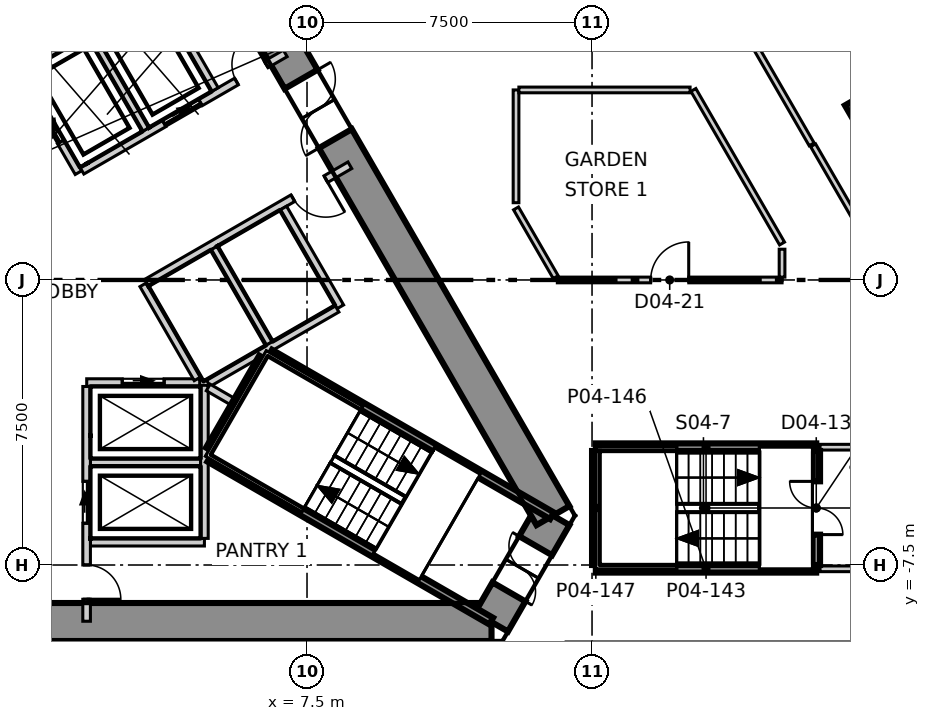
"""IFC4 building model, lengths in metres.
Left out: names, types, materials, properties, quantities, classifications, styles, units other than length and angle.
Written with IfcOpenShell. Run it as: python <this file> out.ifc"""

import sys

from ifc_helpers import new_model, si_unit, direction, frame, frame_2d, origin, origin_2d, place, context, subcontext, project, spatial, polyline, rectangle, outline, extrude, element, fill, save


model = new_model("IFC4")
c1 = context("Model", 3, precision=1e-05, world=origin(), true_north=direction((0.0, 1.0)))
c2 = subcontext(c1, "Body", "Model", "MODEL_VIEW")
j1 = project(units=[si_unit("LENGTHUNIT", "METRE"), si_unit("PLANEANGLEUNIT", "RADIAN")], contexts=[c1])
p1 = place(None, origin())
s1 = spatial("IfcSite", under=j1, at=p1, CompositionType="ELEMENT")
p2 = place(p1, origin())
s2 = spatial("IfcBuilding", under=s1, at=p2, CompositionType="ELEMENT")
p3 = place(p2, frame((0.0, 0.0, 25.3)))
s3 = spatial("IfcBuildingStorey", under=s2, at=p3, CompositionType="ELEMENT", Elevation=25.3)
p4 = place(p3, frame((-12.355, -9.0, -0.4), z_axis=(0.0, 0.0, 1.0), x_axis=(1.0, 0.0, 0.0)))
e1 = element("IfcWall", 1, at=p4, inside=s3, PredefinedType="SHEAR", context=c2, shape_type="SweptSolid", body=[
    extrude(outline(polyline([(-0.289, -0.5), (1.656, -0.5), (3.601, -0.5), (5.547, -0.5), (7.492, -0.5), (9.437, -0.5), (11.382, -0.5), (13.328, -0.5), (15.273, -0.5), (17.218, -0.5), (19.163, -0.5), (21.109, -0.5), (23.054, -0.5), (24.999, -0.5), (24.422, 0.5), (22.566, 0.5), (20.709, 0.5), (18.853, 0.5), (16.996, 0.5), (15.14, 0.5), (13.283, 0.5), (11.427, 0.5), (9.57, 0.5), (7.714, 0.5), (5.857, 0.5), (4.001, 0.5), (2.145, 0.5), (0.288, 0.5), (-0.289, -0.5)])), origin(), (0.0, 0.0, 1.0), 5.0),
])
p5 = place(p3, frame((12.355, -9.0, -0.4), z_axis=(0.0, 0.0, 1.0), x_axis=(0.500077567175, 0.865980615723, 0.0)))
e2 = element("IfcWall", 2, at=p5, inside=s3, PredefinedType="SHEAR", context=c2, shape_type="SweptSolid", body=[
    extrude(outline(polyline([(-0.288, -0.5), (1.617, -0.5), (3.522, -0.5), (2.945, 0.5), (1.617, 0.5), (0.289, 0.499), (-0.288, -0.5)])), origin(), (0.0, 0.0, 1.0), 5.0),
])
p6 = place(p5, frame((0.917, 0.0, 0.4)))
e3 = element("IfcOpeningElement", 3, at=p6, cuts=e2, PredefinedType="OPENING", context=c2, shape_type="SweptSolid", body=[
    extrude(rectangle(XDim=1.4, YDim=2.1, at=frame_2d((0.7, 1.05))), frame((0.0, 0.51, 0.0), z_axis=(0.0, -1.0, 0.0), x_axis=(1.0, 0.0, 0.0)), (0.0, 0.0, 1.0), 1.02),
])
p7 = place(p3, frame((13.972, -6.2, -0.4), z_axis=(0.0, 0.0, 1.0), x_axis=(-0.499992141631, 0.866029940768, 0.0)))
e4 = element("IfcWall", 4, at=p7, inside=s3, PredefinedType="SHEAR", context=c2, shape_type="SweptSolid", body=[
    extrude(outline(polyline([(-0.288, -0.5), (1.657, -0.5), (3.602, -0.5), (5.547, -0.5), (7.493, -0.5), (9.438, -0.5), (11.383, -0.5), (13.328, -0.5), (15.273, -0.5), (17.218, -0.499), (19.164, -0.499), (21.109, -0.499), (23.054, -0.499), (24.999, -0.499), (24.422, 0.5), (22.566, 0.5), (20.709, 0.5), (18.853, 0.5), (16.996, 0.5), (15.14, 0.5), (13.283, 0.5), (11.427, 0.5), (9.57, 0.5), (7.714, 0.5), (5.857, 0.5), (4.001, 0.5), (2.145, 0.5), (0.288, 0.5), (-0.288, -0.5)])), origin(), (0.0, 0.0, 1.0), 5.0),
])
p8 = place(p7, frame((11.455, 0.0, 0.4)))
e5 = element("IfcOpeningElement", 5, at=p8, cuts=e4, PredefinedType="OPENING", context=c2, shape_type="SweptSolid", body=[
    extrude(rectangle(XDim=1.8, YDim=2.1, at=frame_2d((0.9, 1.05))), frame((0.0, 0.51, 0.0), z_axis=(0.0, -1.0, 0.0), x_axis=(1.0, 0.0, 0.0)), (0.0, 0.0, 1.0), 1.02),
])
p9 = place(p3, frame((22.506, 4.219, -0.4), z_axis=(0.0, 0.0, 1.0), x_axis=(-0.5, 0.866025403784, 0.0)))
e6 = element("IfcColumn", 6, at=p9, inside=s3, PredefinedType="COLUMN", context=c2, shape_type="SweptSolid", body=[
    extrude(rectangle(XDim=1.5, YDim=1.1, at=origin_2d()), origin(), (0.0, 0.0, 1.0), 5.0),
])
for number, where, z_axis, x_axis in (
    (7, (21.0, -7.6, 0.0), (0.0, 0.0, 1.0), (1.0, 0.0, 0.0)),
    (8, (21.0, -4.4, 0.0), (0.0, 0.0, 1.0), (1.0, 0.0, 0.0)),
):
    element("IfcWall", number, at=place(p3, frame(where, z_axis=z_axis, x_axis=x_axis)), inside=s3, PredefinedType="PARTITIONING", context=c2, shape_type="SweptSolid", body=[
        extrude(rectangle(XDim=1.9, YDim=0.15, at=frame_2d((0.95, 0.0))), origin(), (0.0, 0.0, 1.0), 4.6),
    ])
p10 = place(p3, frame((20.817, 3.544, 0.0), z_axis=(0.0, 0.0, 1.0), x_axis=(0.500067837396, -0.865986234303, 0.0)))
e9 = element("IfcWall", 9, at=p10, inside=s3, PredefinedType="PARTITIONING", context=c2, shape_type="SweptSolid", body=[
    extrude(rectangle(XDim=2.366, YDim=0.15, at=frame_2d((1.183, 0.0))), origin(), (0.0, 0.0, 1.0), 4.6),
])
p11 = place(p3, frame((18.81, 6.98, 0.0), z_axis=(0.0, 0.0, 1.0), x_axis=(0.499946039687, -0.866056555544, 0.0)))
e10 = element("IfcWall", 10, at=p11, inside=s3, PredefinedType="PARTITIONING", context=c2, shape_type="SweptSolid", body=[
    extrude(rectangle(XDim=3.938, YDim=0.15, at=frame_2d((1.969, 0.0))), origin(), (0.0, 0.0, 1.0), 4.6),
])
p12 = place(p3, frame((14.087, 0.0, 0.0), z_axis=(0.0, 0.0, 1.0), x_axis=(1.0, 0.0, 0.0)))
e11 = element("IfcWall", 11, at=p12, inside=s3, PredefinedType="PARTITIONING", context=c2, shape_type="SweptSolid", body=[
    extrude(rectangle(XDim=5.913, YDim=0.15, at=frame_2d((2.957, 0.0))), origin(), (0.0, 0.0, 1.0), 4.6),
])
p13 = place(p12, frame((2.457, 0.0, 0.0)))
e12 = element("IfcOpeningElement", 12, at=p13, cuts=e11, PredefinedType="OPENING", context=c2, shape_type="SweptSolid", body=[
    extrude(rectangle(XDim=1.0, YDim=2.1, at=frame_2d((0.5, 1.05))), frame((0.0, 0.085, 0.0), z_axis=(0.0, -1.0, 0.0), x_axis=(1.0, 0.0, 0.0)), (0.0, 0.0, 1.0), 0.17),
])
p14 = place(p3, frame((17.667, 5.0, 0.0), z_axis=(0.0, 0.0, 1.0), x_axis=(0.499988162555, -0.866032238029, 0.0)))
e13 = element("IfcWall", 13, at=p14, inside=s3, PredefinedType="PARTITIONING", context=c2, shape_type="SweptSolid", body=[
    extrude(rectangle(XDim=4.666, YDim=0.15, at=frame_2d((2.333, 0.0))), origin(), (0.0, 0.0, 1.0), 4.6),
])
p15 = place(p3, frame((13.0, 1.883, 0.0), z_axis=(0.0, 0.0, 1.0), x_axis=(0.50001262068, -0.866018117109, 0.0)))
e14 = element("IfcWall", 14, at=p15, inside=s3, PredefinedType="PARTITIONING", context=c2, shape_type="SweptSolid", body=[
    extrude(rectangle(XDim=2.088, YDim=0.15, at=frame_2d((1.044, 0.0))), origin(), (0.0, 0.0, 1.0), 4.6),
])
p16 = place(p3, frame((13.0, 2.033, 0.0), z_axis=(0.0, 0.0, 1.0), x_axis=(0.0, 1.0, 0.0)))
e15 = element("IfcWall", 15, at=p16, inside=s3, PredefinedType="PARTITIONING", context=c2, shape_type="SweptSolid", body=[
    extrude(rectangle(XDim=2.967, YDim=0.15, at=frame_2d((1.483, 0.0))), origin(), (0.0, 0.0, 1.0), 4.6),
])
p17 = place(p3, frame((13.075, 5.0, 0.0), z_axis=(0.0, 0.0, 1.0), x_axis=(1.0, 0.0, 0.0)))
e16 = element("IfcWall", 16, at=p17, inside=s3, PredefinedType="PARTITIONING", context=c2, shape_type="SweptSolid", body=[
    extrude(rectangle(XDim=4.505, YDim=0.15, at=frame_2d((2.252, 0.0))), origin(), (0.0, 0.0, 1.0), 4.6),
])
p18 = place(p3, frame((20.0, 0.075, 0.0), z_axis=(0.0, 0.0, 1.0), x_axis=(0.0, 1.0, 0.0)))
e17 = element("IfcWall", 17, at=p18, inside=s3, PredefinedType="PARTITIONING", context=c2, shape_type="SweptSolid", body=[
    extrude(rectangle(XDim=0.734, YDim=0.15, at=frame_2d((0.367, 0.0))), origin(), (0.0, 0.0, 1.0), 4.6),
])
p19 = place(p3, frame((1.8, -4.8, 0.0), z_axis=(0.0, 0.0, 1.0), x_axis=(1.0, 0.0, 0.0)))
e18 = element("IfcWall", 18, at=p19, inside=s3, PredefinedType="SOLIDWALL", context=c2, shape_type="SweptSolid", body=[
    extrude(rectangle(XDim=2.9, YDim=0.2, at=frame_2d((1.45, 0.0))), origin(), (0.0, 0.0, 1.0), 4.6),
])
p20 = place(p3, frame((1.8, -6.9, 0.0), z_axis=(0.0, 0.0, 1.0), x_axis=(1.0, 0.0, 0.0)))
e19 = element("IfcWall", 19, at=p20, inside=s3, PredefinedType="SOLIDWALL", context=c2, shape_type="SweptSolid", body=[
    extrude(rectangle(XDim=3.0, YDim=0.2, at=frame_2d((1.5, 0.0))), origin(), (0.0, 0.0, 1.0), 4.6),
])
p21 = place(p3, frame((1.703, -2.7, 0.0), z_axis=(0.0, 0.0, 1.0), x_axis=(1.0, 0.0, 0.0)))
e20 = element("IfcWall", 20, at=p21, inside=s3, PredefinedType="SOLIDWALL", context=c2, shape_type="SweptSolid", body=[
    extrude(rectangle(XDim=2.973, YDim=0.2, at=frame_2d((1.487, 0.0))), origin(), (0.0, 0.0, 1.0), 4.6),
])
p22 = place(p21, frame((0.936, 0.0, 0.0)))
e21 = element("IfcOpeningElement", 21, at=p22, cuts=e20, PredefinedType="OPENING", context=c2, shape_type="SweptSolid", body=[
    extrude(rectangle(XDim=1.1, YDim=2.1, at=frame_2d((0.55, 1.05))), frame((0.0, 0.11, 0.0), z_axis=(0.0, -1.0, 0.0), x_axis=(1.0, 0.0, 0.0)), (0.0, 0.0, 1.0), 0.22),
])
p23 = place(p3, frame((-0.002, 5.541, 0.0), z_axis=(0.0, 0.0, 1.0), x_axis=(0.86600155993, 0.500041296494, 0.0)))
e22 = element("IfcWall", 22, at=p23, inside=s3, PredefinedType="SOLIDWALL", context=c2, shape_type="SweptSolid", body=[
    extrude(rectangle(XDim=4.132, YDim=0.2, at=frame_2d((2.066, 0.0))), origin(), (0.0, 0.0, 1.0), 4.6),
])
p24 = place(p3, frame((0.0, 5.4, 0.0), z_axis=(0.0, 0.0, 1.0), x_axis=(0.500103862429, -0.865965430478, 0.0)))
e23 = element("IfcWall", 23, at=p24, inside=s3, PredefinedType="SOLIDWALL", context=c2, shape_type="SweptSolid", body=[
    extrude(rectangle(XDim=2.973, YDim=0.2, at=frame_2d((1.487, 0.0))), origin(), (0.0, 0.0, 1.0), 4.6),
])
p25 = place(p24, frame((0.937, 0.0, 0.0)))
e24 = element("IfcOpeningElement", 24, at=p25, cuts=e23, PredefinedType="OPENING", context=c2, shape_type="SweptSolid", body=[
    extrude(rectangle(XDim=1.1, YDim=2.1, at=frame_2d((0.55, 1.05))), frame((0.0, 0.11, 0.0), z_axis=(0.0, -1.0, 0.0), x_axis=(1.0, 0.0, 0.0)), (0.0, 0.0, 1.0), 0.22),
])
p26 = place(p3, frame((3.19, -0.125, 0.0), z_axis=(0.0, 0.0, 1.0), x_axis=(0.499988658015, -0.866031951983, 0.0)))
e25 = element("IfcWall", 25, at=p26, inside=s3, PredefinedType="SOLIDWALL", context=c2, shape_type="SweptSolid", body=[
    extrude(rectangle(XDim=2.858, YDim=0.2, at=frame_2d((1.429, 0.0))), origin(), (0.0, 0.0, 1.0), 4.6),
])
p27 = place(p3, frame((1.578, 2.874, 0.0), z_axis=(0.0, 0.0, 1.0), x_axis=(0.866055259465, 0.499948284879, 0.0)))
e26 = element("IfcWall", 26, at=p27, inside=s3, PredefinedType="SOLIDWALL", context=c2, shape_type="SweptSolid", body=[
    extrude(rectangle(XDim=6.177, YDim=0.2, at=frame_2d((3.088, 0.0))), origin(), (0.0, 0.0, 1.0), 4.6),
])
p28 = place(p27, frame((2.496, 0.0, 0.0)))
e27 = element("IfcOpeningElement", 27, at=p28, cuts=e26, PredefinedType="OPENING", context=c2, shape_type="SweptSolid", body=[
    extrude(rectangle(XDim=1.1, YDim=2.1, at=frame_2d((0.55, 1.05))), frame((0.0, 0.11, 0.0), z_axis=(0.0, -1.0, 0.0), x_axis=(1.0, 0.0, 0.0)), (0.0, 0.0, 1.0), 0.22),
])
p29 = place(p27, frame((4.696, 0.0, 0.0)))
e28 = element("IfcOpeningElement", 28, at=p29, cuts=e26, PredefinedType="OPENING", context=c2, shape_type="SweptSolid", body=[
    extrude(rectangle(XDim=0.9, YDim=2.1, at=frame_2d((0.45, 1.05))), frame((0.0, 0.11, 0.0), z_axis=(0.0, -1.0, 0.0), x_axis=(1.0, 0.0, 0.0)), (0.0, 0.0, 1.0), 0.22),
])
p30 = place(p3, frame((1.7, -8.98, 0.0), z_axis=(0.0, 0.0, 1.0), x_axis=(0.0, 1.0, 0.0)))
e29 = element("IfcWall", 29, at=p30, inside=s3, PredefinedType="SOLIDWALL", context=c2, shape_type="SweptSolid", body=[
    extrude(rectangle(XDim=6.177, YDim=0.2, at=frame_2d((3.088, 0.0))), origin(), (0.0, 0.0, 1.0), 4.6),
])
p31 = place(p30, frame((2.58, 0.0, 0.0)))
e30 = element("IfcOpeningElement", 30, at=p31, cuts=e29, PredefinedType="OPENING", context=c2, shape_type="SweptSolid", body=[
    extrude(rectangle(XDim=1.1, YDim=2.1, at=frame_2d((0.55, 1.05))), frame((0.0, 0.11, 0.0), z_axis=(0.0, -1.0, 0.0), x_axis=(1.0, 0.0, 0.0)), (0.0, 0.0, 1.0), 0.22),
])
p32 = place(p30, frame((0.58, 0.0, 0.0)))
e31 = element("IfcOpeningElement", 31, at=p32, cuts=e29, PredefinedType="OPENING", context=c2, shape_type="SweptSolid", body=[
    extrude(rectangle(XDim=0.9, YDim=2.1, at=frame_2d((0.45, 1.05))), frame((0.0, 0.11, 0.0), z_axis=(0.0, -1.0, 0.0), x_axis=(1.0, 0.0, 0.0)), (0.0, 0.0, 1.0), 0.22),
])
p33 = place(p3, frame((4.8, -6.8, 0.0), z_axis=(0.0, 0.0, 1.0), x_axis=(0.0, 1.0, 0.0)))
e32 = element("IfcWall", 32, at=p33, inside=s3, PredefinedType="SOLIDWALL", context=c2, shape_type="SweptSolid", body=[
    extrude(rectangle(XDim=4.029, YDim=0.2, at=frame_2d((2.015, 0.0))), origin(), (0.0, 0.0, 1.0), 4.6),
])
p34 = place(p3, frame((3.278, -0.071, 0.0), z_axis=(0.0, 0.0, 1.0), x_axis=(0.865959795517, 0.500113619639, 0.0)))
e33 = element("IfcWall", 33, at=p34, inside=s3, PredefinedType="SOLIDWALL", context=c2, shape_type="SweptSolid", body=[
    extrude(rectangle(XDim=6.177, YDim=0.2, at=frame_2d((3.088, 0.0))), origin(), (0.0, 0.0, 1.0), 4.6),
])
p35 = place(p34, frame((4.447, 0.0, 0.0)))
e34 = element("IfcOpeningElement", 34, at=p35, cuts=e33, PredefinedType="OPENING", context=c2, shape_type="SweptSolid", body=[
    extrude(rectangle(XDim=1.0, YDim=2.1, at=frame_2d((0.5, 1.05))), frame((0.0, 0.11, 0.0), z_axis=(0.0, -1.0, 0.0), x_axis=(1.0, 0.0, 0.0)), (0.0, 0.0, 1.0), 0.22),
])
p36 = place(p3, frame((3.626, 7.52, 0.0), z_axis=(0.0, 0.0, 1.0), x_axis=(0.500060147554, -0.865990674793, 0.0)))
e35 = element("IfcWall", 35, at=p36, inside=s3, PredefinedType="SOLIDWALL", context=c2, shape_type="SweptSolid", body=[
    extrude(rectangle(XDim=2.9, YDim=0.2, at=frame_2d((1.45, 0.0))), origin(), (0.0, 0.0, 1.0), 4.6),
])
p37 = place(p3, frame((6.876, 1.891, 0.0), z_axis=(0.0, 0.0, 1.0), x_axis=(0.499990139034, -0.866031096941, 0.0)))
e36 = element("IfcWall", 36, at=p37, inside=s3, PredefinedType="SOLIDWALL", context=c2, shape_type="SweptSolid", body=[
    extrude(rectangle(XDim=3.0, YDim=0.2, at=frame_2d((1.5, 0.0))), origin(), (0.0, 0.0, 1.0), 4.6),
])
for number, where, z_axis, x_axis in (
    (37, (1.807, 6.47, 0.0), (0.0, 0.0, 1.0), (0.5, -0.866, 0.0)),
    (38, (5.057, 0.841, 0.0), (0.0, 0.0, 1.0), (0.5, -0.866, 0.0)),
):
    element("IfcWall", number, at=place(p3, frame(where, z_axis=z_axis, x_axis=x_axis)), inside=s3, PredefinedType="SOLIDWALL", context=c2, shape_type="SweptSolid", body=[
        extrude(rectangle(XDim=2.9, YDim=0.2, at=frame_2d((1.45, 0.0))), origin(), (0.0, 0.0, 1.0), 4.6),
    ])
p38 = place(p3, frame((4.9, -2.714, 0.0), z_axis=(0.0, 0.0, 1.0), x_axis=(0.865992350556, 0.500057245502, 0.0)))
e39 = element("IfcWall", 39, at=p38, inside=s3, PredefinedType="SOLIDWALL", context=c2, shape_type="SweptSolid", body=[
    extrude(rectangle(XDim=3.914, YDim=0.2, at=frame_2d((1.957, 0.0))), origin(), (0.0, 0.0, 1.0), 4.6),
])
p39 = place(p3, frame((4.9, -2.829, 0.0), z_axis=(0.0, 0.0, 1.0), x_axis=(0.865944298464, -0.500140452231, 0.0)))
e40 = element("IfcWall", 40, at=p39, inside=s3, PredefinedType="SOLIDWALL", context=c2, shape_type="SweptSolid", body=[
    extrude(rectangle(XDim=0.741, YDim=0.2, at=frame_2d((0.371, 0.0))), origin(), (0.0, 0.0, 1.0), 4.6),
])
p40 = place(p3, frame((4.929, -4.462, 0.0), z_axis=(0.0, 0.0, 1.0), x_axis=(0.500200581029, 0.865909567298, 0.0)))
e41 = element("IfcWall", 41, at=p40, inside=s3, PredefinedType="SOLIDWALL", context=c2, shape_type="SweptSolid", body=[
    extrude(rectangle(XDim=2.799, YDim=0.2, at=frame_2d((1.399, 0.0))), origin(), (0.0, 0.0, 1.0), 4.6),
])
p41 = place(p3, frame((6.529, -1.922, 0.0), z_axis=(0.0, 0.0, 1.0), x_axis=(0.866036527536, -0.499980732602, 0.0)))
e42 = element("IfcWall", 42, at=p41, inside=s3, PredefinedType="SOLIDWALL", context=c2, shape_type="SweptSolid", body=[
    extrude(rectangle(XDim=8.564, YDim=0.2, at=frame_2d((4.282, 0.0))), origin(), (0.0, 0.0, 1.0), 4.6),
])
p42 = place(p3, frame((4.929, -4.693, 0.0), z_axis=(0.0, 0.0, 1.0), x_axis=(0.865987152174, -0.50006624788, 0.0)))
e43 = element("IfcWall", 43, at=p42, inside=s3, PredefinedType="SOLIDWALL", context=c2, shape_type="SweptSolid", body=[
    extrude(rectangle(XDim=8.565, YDim=0.2, at=frame_2d((4.282, 0.0))), origin(), (0.0, 0.0, 1.0), 4.6),
])
p43 = place(p3, frame((15.1, -4.4, 0.0), z_axis=(0.0, 0.0, 1.0), x_axis=(1.0, 0.0, 0.0)))
e44 = element("IfcWall", 44, at=p43, inside=s3, PredefinedType="SOLIDWALL", context=c2, shape_type="SweptSolid", body=[
    extrude(rectangle(XDim=5.8, YDim=0.2, at=frame_2d((2.9, 0.0))), origin(), (0.0, 0.0, 1.0), 4.6),
])
p44 = place(p3, frame((15.1, -7.6, 0.0), z_axis=(0.0, 0.0, 1.0), x_axis=(1.0, 0.0, 0.0)))
e45 = element("IfcWall", 45, at=p44, inside=s3, PredefinedType="SOLIDWALL", context=c2, shape_type="SweptSolid", body=[
    extrude(rectangle(XDim=5.798, YDim=0.2, at=frame_2d((2.899, 0.0))), origin(), (0.0, 0.0, 1.0), 4.6),
])
p45 = place(p3, frame((15.1, -7.5, 0.0), z_axis=(0.0, 0.0, 1.0), x_axis=(0.0, 1.0, 0.0)))
e46 = element("IfcWall", 46, at=p45, inside=s3, PredefinedType="SOLIDWALL", context=c2, shape_type="SweptSolid", body=[
    extrude(rectangle(XDim=3.0, YDim=0.2, at=frame_2d((1.5, 0.0))), origin(), (0.0, 0.0, 1.0), 4.6),
])
p46 = place(p3, frame((20.9, -7.5, 0.0), z_axis=(0.0, 0.0, 1.0), x_axis=(0.0, 1.0, 0.0)))
e47 = element("IfcWall", 47, at=p46, inside=s3, PredefinedType="SOLIDWALL", context=c2, shape_type="SweptSolid", body=[
    extrude(rectangle(XDim=3.0, YDim=0.2, at=frame_2d((1.5, 0.0))), origin(), (0.0, 0.0, 1.0), 4.6),
])
p47 = place(p46, frame((0.8, 0.0, 0.0)))
e48 = element("IfcOpeningElement", 48, at=p47, cuts=e47, PredefinedType="OPENING", context=c2, shape_type="SweptSolid", body=[
    extrude(rectangle(XDim=1.4, YDim=2.1, at=frame_2d((0.7, 1.05))), frame((0.0, 0.11, 0.0), z_axis=(0.0, -1.0, 0.0), x_axis=(1.0, 0.0, 0.0)), (0.0, 0.0, 1.0), 0.22),
])
p48 = place(p22, origin())
e49 = element("IfcDoor", 49, at=p48, inside=s3, OperationType="SLIDING_TO_LEFT", PredefinedType="DOOR", context=c2, shape_type="SweptSolid", body=[
    extrude(rectangle(XDim=1.1, YDim=2.1, at=frame_2d((0.55, 1.05))), frame((0.0, 0.025, 0.0), z_axis=(0.0, -1.0, 0.0), x_axis=(1.0, 0.0, 0.0)), (0.0, 0.0, 1.0), 0.05),
])
fill(e21, e49)
p49 = place(p31, origin())
e50 = element("IfcDoor", 50, at=p49, inside=s3, OperationType="SLIDING_TO_LEFT", PredefinedType="DOOR", context=c2, shape_type="SweptSolid", body=[
    extrude(rectangle(XDim=1.1, YDim=2.1, at=frame_2d((0.55, 1.05))), frame((0.0, 0.025, 0.0), z_axis=(0.0, -1.0, 0.0), x_axis=(1.0, 0.0, 0.0)), (0.0, 0.0, 1.0), 0.05),
])
fill(e30, e50)
p50 = place(p25, origin())
e51 = element("IfcDoor", 51, at=p50, inside=s3, OperationType="SLIDING_TO_LEFT", PredefinedType="DOOR", context=c2, shape_type="SweptSolid", body=[
    extrude(rectangle(XDim=1.1, YDim=2.1, at=frame_2d((0.55, 1.05))), frame((0.0, 0.025, 0.0), z_axis=(0.0, -1.0, 0.0), x_axis=(1.0, 0.0, 0.0)), (0.0, 0.0, 1.0), 0.05),
])
fill(e24, e51)
p51 = place(p28, origin())
e52 = element("IfcDoor", 52, at=p51, inside=s3, OperationType="SLIDING_TO_LEFT", PredefinedType="DOOR", context=c2, shape_type="SweptSolid", body=[
    extrude(rectangle(XDim=1.1, YDim=2.1, at=frame_2d((0.55, 1.05))), frame((0.0, 0.025, 0.0), z_axis=(0.0, -1.0, 0.0), x_axis=(1.0, 0.0, 0.0)), (0.0, 0.0, 1.0), 0.05),
])
fill(e27, e52)
p52 = place(p47, origin())
e53 = element("IfcDoor", 53, at=p52, inside=s3, OperationType="DOUBLE_DOOR_SINGLE_SWING", PredefinedType="DOOR", context=c2, shape_type="SweptSolid", body=[
    extrude(rectangle(XDim=1.4, YDim=2.1, at=frame_2d((0.7, 1.05))), frame((0.0, 0.025, 0.0), z_axis=(0.0, -1.0, 0.0), x_axis=(1.0, 0.0, 0.0)), (0.0, 0.0, 1.0), 0.05),
])
fill(e48, e53)
p53 = place(p13, origin())
e54 = element("IfcDoor", 54, at=p53, inside=s3, OperationType="SINGLE_SWING_LEFT", PredefinedType="DOOR", context=c2, shape_type="SweptSolid", body=[
    extrude(rectangle(XDim=1.0, YDim=2.1, at=frame_2d((0.5, 1.05))), frame((0.0, 0.025, 0.0), z_axis=(0.0, -1.0, 0.0), x_axis=(1.0, 0.0, 0.0)), (0.0, 0.0, 1.0), 0.05),
])
fill(e12, e54)
p54 = place(p8, origin())
e55 = element("IfcDoor", 55, at=p54, inside=s3, OperationType="DOUBLE_DOOR_SINGLE_SWING", PredefinedType="DOOR", context=c2, shape_type="SweptSolid", body=[
    extrude(rectangle(XDim=1.8, YDim=2.1, at=frame_2d((0.9, 1.05))), frame((0.0, 0.025, 0.0), z_axis=(0.0, -1.0, 0.0), x_axis=(1.0, 0.0, 0.0)), (0.0, 0.0, 1.0), 0.05),
])
fill(e5, e55)
p55 = place(p6, origin())
e56 = element("IfcDoor", 56, at=p55, inside=s3, OperationType="DOUBLE_DOOR_SINGLE_SWING", PredefinedType="DOOR", context=c2, shape_type="SweptSolid", body=[
    extrude(rectangle(XDim=1.4, YDim=2.1, at=frame_2d((0.7, 1.05))), frame((0.0, 0.025, 0.0), z_axis=(0.0, -1.0, 0.0), x_axis=(1.0, 0.0, 0.0)), (0.0, 0.0, 1.0), 0.05),
])
fill(e3, e56)
p56 = place(p29, origin())
e57 = element("IfcDoor", 57, at=p56, inside=s3, OperationType="SINGLE_SWING_LEFT", PredefinedType="DOOR", context=c2, shape_type="SweptSolid", body=[
    extrude(rectangle(XDim=0.9, YDim=2.1, at=frame_2d((0.45, 1.05))), frame((0.0, 0.025, 0.0), z_axis=(0.0, -1.0, 0.0), x_axis=(1.0, 0.0, 0.0)), (0.0, 0.0, 1.0), 0.05),
])
fill(e28, e57)
p57 = place(p32, origin())
e58 = element("IfcDoor", 58, at=p57, inside=s3, OperationType="SINGLE_SWING_LEFT", PredefinedType="DOOR", context=c2, shape_type="SweptSolid", body=[
    extrude(rectangle(XDim=0.9, YDim=2.1, at=frame_2d((0.45, 1.05))), frame((0.0, 0.025, 0.0), z_axis=(0.0, -1.0, 0.0), x_axis=(1.0, 0.0, 0.0)), (0.0, 0.0, 1.0), 0.05),
])
fill(e31, e58)
p58 = place(p35, origin())
e59 = element("IfcDoor", 59, at=p58, inside=s3, OperationType="SINGLE_SWING_RIGHT", PredefinedType="DOOR", context=c2, shape_type="SweptSolid", body=[
    extrude(rectangle(XDim=1.0, YDim=2.1, at=frame_2d((0.5, 1.05))), frame((0.0, 0.025, 0.0), z_axis=(0.0, -1.0, 0.0), x_axis=(1.0, 0.0, 0.0)), (0.0, 0.0, 1.0), 0.05),
])
fill(e34, e59)
save(model, sys.argv[1])
